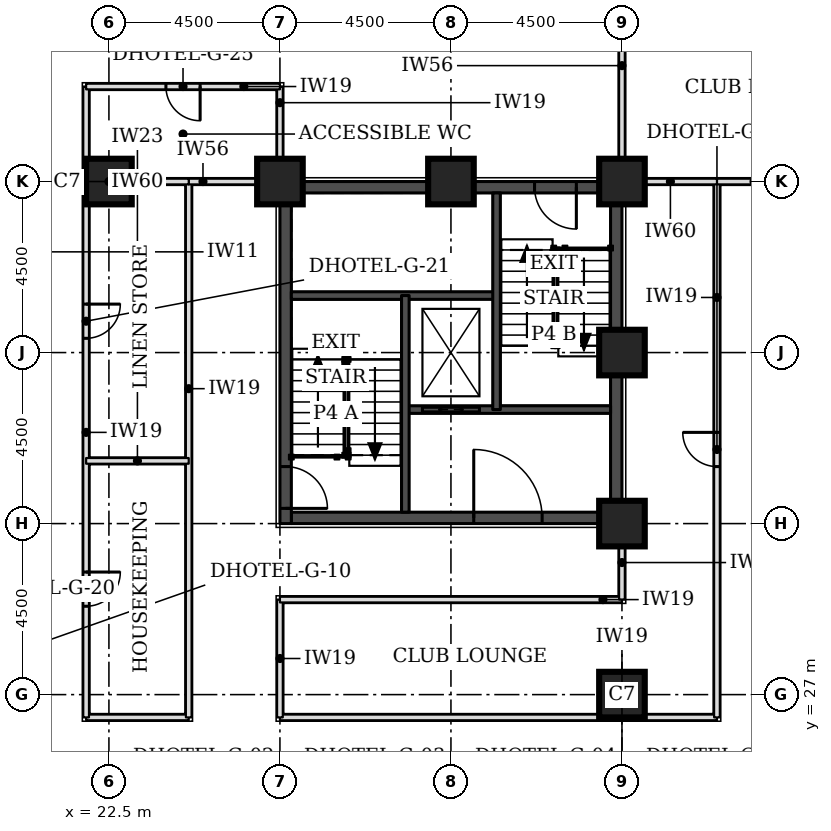
"""IFC4 building model, lengths in metres.
Left out: names, types, materials, properties, quantities, classifications, styles, units other than length and angle.
Written with IfcOpenShell. Run it as: python <this file> out.ifc"""

import sys

from ifc_helpers import new_model, si_unit, direction, frame, frame_2d, origin, origin_2d, place, context, subcontext, project, spatial, rectangle, extrude, element, fill, save


model = new_model("IFC4")
c1 = context("Model", 3, precision=1e-05, world=origin(), true_north=direction((0.0, 1.0)))
c2 = subcontext(c1, "Body", "Model", "MODEL_VIEW")
j1 = project(units=[si_unit("LENGTHUNIT", "METRE"), si_unit("PLANEANGLEUNIT", "RADIAN")], contexts=[c1])
p1 = place(None, origin())
s1 = spatial("IfcSite", under=j1, at=p1, CompositionType="ELEMENT")
p2 = place(p1, origin())
s2 = spatial("IfcBuilding", under=s1, at=p2, CompositionType="ELEMENT")
p3 = place(p2, frame((0.0, 0.0, 66.0)))
s3 = spatial("IfcBuildingStorey", under=s2, at=p3, CompositionType="ELEMENT", Elevation=66.0)
for number, where, z_axis, x_axis in (
    (1, (36.0, 27.0, 0.0), (0.0, 0.0, 1.0), (1.0, 0.0, 0.0)),
    (2, (36.0, 31.5, 0.0), (0.0, 0.0, 1.0), (1.0, 0.0, 0.0)),
    (3, (36.0, 36.0, 0.0), (0.0, 0.0, 1.0), (1.0, 0.0, 0.0)),
    (4, (22.5, 40.5, 0.0), (0.0, 0.0, 1.0), (1.0, 0.0, 0.0)),
    (5, (27.0, 40.5, 0.0), (0.0, 0.0, 1.0), (1.0, 0.0, 0.0)),
    (6, (31.5, 40.5, 0.0), (0.0, 0.0, 1.0), (1.0, 0.0, 0.0)),
    (7, (36.0, 40.5, 0.0), (0.0, 0.0, 1.0), (1.0, 0.0, 0.0)),
):
    element("IfcColumn", number, at=place(p3, frame(where, z_axis=z_axis, x_axis=x_axis)), inside=s3, PredefinedType="COLUMN", context=c2, shape_type="SweptSolid", body=[
        extrude(rectangle(XDim=1.2, YDim=1.2, at=origin_2d()), origin(), (0.0, 0.0, 1.0), 3.3),
    ])
p4 = place(p3, frame((27.3, 31.65, 0.0), z_axis=(0.0, 0.0, 1.0), x_axis=(1.0, 0.0, 0.0)))
e8 = element("IfcWall", 8, at=p4, inside=s3, PredefinedType="SHEAR", context=c2, shape_type="SweptSolid", body=[
    extrude(rectangle(XDim=8.4, YDim=0.3, at=frame_2d((4.2, 0.0))), origin(), (0.0, 0.0, 1.0), 3.3),
])
p5 = place(p4, frame((4.8, 0.0, 0.0)))
e9 = element("IfcOpeningElement", 9, at=p5, cuts=e8, PredefinedType="OPENING", context=c2, shape_type="SweptSolid", body=[
    extrude(rectangle(XDim=1.8, YDim=2.1, at=frame_2d((0.9, 1.05))), frame((0.0, 0.16, 0.0), z_axis=(0.0, -1.0, 0.0), x_axis=(1.0, 0.0, 0.0)), (0.0, 0.0, 1.0), 0.32),
])
p6 = place(p3, frame((27.3, 40.35, 0.0), z_axis=(0.0, 0.0, 1.0), x_axis=(1.0, 0.0, 0.0)))
e10 = element("IfcWall", 10, at=p6, inside=s3, PredefinedType="SHEAR", context=c2, shape_type="SweptSolid", body=[
    extrude(rectangle(XDim=8.4, YDim=0.3, at=frame_2d((4.2, 0.0))), origin(), (0.0, 0.0, 1.0), 3.3),
])
p7 = place(p6, frame((6.4, 0.0, 0.0)))
e11 = element("IfcOpeningElement", 11, at=p7, cuts=e10, PredefinedType="OPENING", context=c2, shape_type="SweptSolid", body=[
    extrude(rectangle(XDim=1.1, YDim=2.1, at=frame_2d((0.55, 1.05))), frame((0.0, 0.16, 0.0), z_axis=(0.0, -1.0, 0.0), x_axis=(1.0, 0.0, 0.0)), (0.0, 0.0, 1.0), 0.32),
])
p8 = place(p3, frame((27.15, 31.5, 0.0), z_axis=(0.0, 0.0, 1.0), x_axis=(0.0, 1.0, 0.0)))
e12 = element("IfcWall", 12, at=p8, inside=s3, PredefinedType="SHEAR", context=c2, shape_type="SweptSolid", body=[
    extrude(rectangle(XDim=9.0, YDim=0.3, at=frame_2d((4.5, 0.0))), origin(), (0.0, 0.0, 1.0), 3.3),
])
p9 = place(p8, frame((0.4, 0.0, 0.0)))
e13 = element("IfcOpeningElement", 13, at=p9, cuts=e12, PredefinedType="OPENING", context=c2, shape_type="SweptSolid", body=[
    extrude(rectangle(XDim=1.1, YDim=2.1, at=frame_2d((0.55, 1.05))), frame((0.0, 0.16, 0.0), z_axis=(0.0, -1.0, 0.0), x_axis=(1.0, 0.0, 0.0)), (0.0, 0.0, 1.0), 0.32),
])
p10 = place(p3, frame((35.85, 31.5, 0.0), z_axis=(0.0, 0.0, 1.0), x_axis=(0.0, 1.0, 0.0)))
e14 = element("IfcWall", 14, at=p10, inside=s3, PredefinedType="SHEAR", context=c2, shape_type="SweptSolid", body=[
    extrude(rectangle(XDim=9.0, YDim=0.3, at=frame_2d((4.5, 0.0))), origin(), (0.0, 0.0, 1.0), 3.3),
])
p11 = place(p3, frame((21.9, 26.4, 0.0), z_axis=(0.0, 0.0, 1.0), x_axis=(1.0, 0.0, 0.0)))
e15 = element("IfcWall", 15, at=p11, inside=s3, PredefinedType="PARTITIONING", context=c2, shape_type="SweptSolid", body=[
    extrude(rectangle(XDim=2.7, YDim=0.15, at=frame_2d((1.35, 0.0))), origin(), (0.0, 0.0, 1.0), 3.08),
])
p12 = place(p3, frame((21.9, 26.4, 0.0), z_axis=(0.0, 0.0, 1.0), x_axis=(0.0, 1.0, 0.0)))
e16 = element("IfcWall", 16, at=p12, inside=s3, PredefinedType="PARTITIONING", context=c2, shape_type="SweptSolid", body=[
    extrude(rectangle(XDim=16.6, YDim=0.15, at=frame_2d((8.3, 0.0))), origin(), (0.0, 0.0, 1.0), 3.08),
])
p13 = place(p12, frame((2.925, 0.0, 0.0)))
e17 = element("IfcOpeningElement", 17, at=p13, cuts=e16, PredefinedType="OPENING", context=c2, shape_type="SweptSolid", body=[
    extrude(rectangle(XDim=0.9, YDim=2.1, at=frame_2d((0.45, 1.05))), frame((0.0, 0.085, 0.0), z_axis=(0.0, -1.0, 0.0), x_axis=(1.0, 0.0, 0.0)), (0.0, 0.0, 1.0), 0.17),
])
p14 = place(p12, frame((9.975, 0.0, 0.0)))
e18 = element("IfcOpeningElement", 18, at=p14, cuts=e16, PredefinedType="OPENING", context=c2, shape_type="SweptSolid", body=[
    extrude(rectangle(XDim=0.9, YDim=2.1, at=frame_2d((0.45, 1.05))), frame((0.0, 0.085, 0.0), z_axis=(0.0, -1.0, 0.0), x_axis=(1.0, 0.0, 0.0)), (0.0, 0.0, 1.0), 0.17),
])
p15 = place(p3, frame((24.6, 26.4, 0.0), z_axis=(0.0, 0.0, 1.0), x_axis=(0.0, 1.0, 0.0)))
e19 = element("IfcWall", 19, at=p15, inside=s3, PredefinedType="PARTITIONING", context=c2, shape_type="SweptSolid", body=[
    extrude(rectangle(XDim=14.1, YDim=0.15, at=frame_2d((7.05, 0.0))), origin(), (0.0, 0.0, 1.0), 3.08),
])
p16 = place(p3, frame((27.0, 26.4, 0.0), z_axis=(0.0, 0.0, 1.0), x_axis=(1.0, 0.0, 0.0)))
e20 = element("IfcWall", 20, at=p16, inside=s3, PredefinedType="PARTITIONING", context=c2, shape_type="SweptSolid", body=[
    extrude(rectangle(XDim=11.5, YDim=0.15, at=frame_2d((5.75, 0.0))), origin(), (0.0, 0.0, 1.0), 3.08),
])
p17 = place(p3, frame((27.0, 26.4, 0.0), z_axis=(0.0, 0.0, 1.0), x_axis=(0.0, 1.0, 0.0)))
e21 = element("IfcWall", 21, at=p17, inside=s3, PredefinedType="PARTITIONING", context=c2, shape_type="SweptSolid", body=[
    extrude(rectangle(XDim=3.1, YDim=0.15, at=frame_2d((1.55, 0.0))), origin(), (0.0, 0.0, 1.0), 3.08),
])
p18 = place(p3, frame((38.5, 26.4, 0.0), z_axis=(0.0, 0.0, 1.0), x_axis=(0.0, 1.0, 0.0)))
e22 = element("IfcWall", 22, at=p18, inside=s3, PredefinedType="PARTITIONING", context=c2, shape_type="SweptSolid", body=[
    extrude(rectangle(XDim=14.1, YDim=0.15, at=frame_2d((7.05, 0.0))), origin(), (0.0, 0.0, 1.0), 3.08),
])
p19 = place(p18, frame((6.6, 0.0, 0.0)))
e23 = element("IfcOpeningElement", 23, at=p19, cuts=e22, PredefinedType="OPENING", context=c2, shape_type="SweptSolid", body=[
    extrude(rectangle(XDim=0.9, YDim=2.1, at=frame_2d((0.45, 1.05))), frame((0.0, 0.085, 0.0), z_axis=(0.0, -1.0, 0.0), x_axis=(1.0, 0.0, 0.0)), (0.0, 0.0, 1.0), 0.17),
])
p20 = place(p3, frame((27.0, 29.5, 0.0), z_axis=(0.0, 0.0, 1.0), x_axis=(1.0, 0.0, 0.0)))
e24 = element("IfcWall", 24, at=p20, inside=s3, PredefinedType="PARTITIONING", context=c2, shape_type="SweptSolid", body=[
    extrude(rectangle(XDim=9.0, YDim=0.15, at=frame_2d((4.5, 0.0))), origin(), (0.0, 0.0, 1.0), 3.08),
])
p21 = place(p3, frame((36.0, 29.5, 0.0), z_axis=(0.0, 0.0, 1.0), x_axis=(0.0, 1.0, 0.0)))
e25 = element("IfcWall", 25, at=p21, inside=s3, PredefinedType="PARTITIONING", context=c2, shape_type="SweptSolid", body=[
    extrude(rectangle(XDim=1.95, YDim=0.15, at=frame_2d((0.975, 0.0))), origin(), (0.0, 0.0, 1.0), 2.33),
])
p22 = place(p3, frame((24.6, 40.5, 0.0), z_axis=(0.0, 0.0, 1.0), x_axis=(1.0, 0.0, 0.0)))
e26 = element("IfcWall", 26, at=p22, inside=s3, PredefinedType="PARTITIONING", context=c2, shape_type="SweptSolid", body=[
    extrude(rectangle(XDim=2.35, YDim=0.15, at=frame_2d((1.175, 0.0))), origin(), (0.0, 0.0, 1.0), 2.33),
])
p23 = place(p3, frame((38.5, 40.5, 0.0), z_axis=(0.0, 0.0, 1.0), x_axis=(1.0, 0.0, 0.0)))
e27 = element("IfcWall", 27, at=p23, inside=s3, PredefinedType="PARTITIONING", context=c2, shape_type="SweptSolid", body=[
    extrude(rectangle(XDim=1.95, YDim=0.15, at=frame_2d((0.975, 0.0))), origin(), (0.0, 0.0, 1.0), 2.33),
])
p24 = place(p3, frame((27.0, 40.55, 0.0), z_axis=(0.0, 0.0, 1.0), x_axis=(0.0, 1.0, 0.0)))
e28 = element("IfcWall", 28, at=p24, inside=s3, PredefinedType="PARTITIONING", context=c2, shape_type="SweptSolid", body=[
    extrude(rectangle(XDim=2.45, YDim=0.15, at=frame_2d((1.225, 0.0))), origin(), (0.0, 0.0, 1.0), 3.08),
])
p25 = place(p3, frame((36.0, 40.55, 0.0), z_axis=(0.0, 0.0, 1.0), x_axis=(0.0, 1.0, 0.0)))
e29 = element("IfcWall", 29, at=p25, inside=s3, PredefinedType="PARTITIONING", context=c2, shape_type="SweptSolid", body=[
    extrude(rectangle(XDim=4.4, YDim=0.15, at=frame_2d((2.2, 0.0))), origin(), (0.0, 0.0, 1.0), 2.33),
])
p26 = place(p3, frame((21.9, 43.0, 0.0), z_axis=(0.0, 0.0, 1.0), x_axis=(1.0, 0.0, 0.0)))
e30 = element("IfcWall", 30, at=p26, inside=s3, PredefinedType="PARTITIONING", context=c2, shape_type="SweptSolid", body=[
    extrude(rectangle(XDim=5.1, YDim=0.15, at=frame_2d((2.55, 0.0))), origin(), (0.0, 0.0, 1.0), 3.08),
])
p27 = place(p26, frame((2.1, 0.0, 0.0)))
e31 = element("IfcOpeningElement", 31, at=p27, cuts=e30, PredefinedType="OPENING", context=c2, shape_type="SweptSolid", body=[
    extrude(rectangle(XDim=0.9, YDim=2.1, at=frame_2d((0.45, 1.05))), frame((0.0, 0.085, 0.0), z_axis=(0.0, -1.0, 0.0), x_axis=(1.0, 0.0, 0.0)), (0.0, 0.0, 1.0), 0.17),
])
p28 = place(p3, frame((21.9, 33.15, 0.0), z_axis=(0.0, 0.0, 1.0), x_axis=(1.0, 0.0, 0.0)))
e32 = element("IfcWall", 32, at=p28, inside=s3, PredefinedType="PARTITIONING", context=c2, shape_type="SweptSolid", body=[
    extrude(rectangle(XDim=2.7, YDim=0.15, at=frame_2d((1.35, 0.0))), origin(), (0.0, 0.0, 1.0), 3.08),
])
p29 = place(p3, frame((21.9, 40.5, 0.0), z_axis=(0.0, 0.0, 1.0), x_axis=(1.0, 0.0, 0.0)))
e33 = element("IfcWall", 33, at=p29, inside=s3, PredefinedType="PARTITIONING", context=c2, shape_type="SweptSolid", body=[
    extrude(rectangle(XDim=2.7, YDim=0.15, at=frame_2d((1.35, 0.0))), origin(), (0.0, 0.0, 1.0), 2.33),
])
p30 = place(p3, frame((36.05, 40.5, 0.0), z_axis=(0.0, 0.0, 1.0), x_axis=(1.0, 0.0, 0.0)))
e34 = element("IfcWall", 34, at=p30, inside=s3, PredefinedType="PARTITIONING", context=c2, shape_type="SweptSolid", body=[
    extrude(rectangle(XDim=2.45, YDim=0.15, at=frame_2d((1.225, 0.0))), origin(), (0.0, 0.0, 1.0), 2.33),
])
p31 = place(p3, frame((30.3, 34.5, 0.0), z_axis=(0.0, 0.0, 1.0), x_axis=(1.0, 0.0, 0.0)))
e35 = element("IfcWall", 35, at=p31, inside=s3, PredefinedType="SOLIDWALL", context=c2, shape_type="SweptSolid", body=[
    extrude(rectangle(XDim=5.4, YDim=0.2, at=frame_2d((2.7, 0.0))), origin(), (0.0, 0.0, 1.0), 3.08),
])
p32 = place(p31, frame((0.45, 0.0, 0.0)))
e36 = element("IfcOpeningElement", 36, at=p32, cuts=e35, PredefinedType="OPENING", context=c2, shape_type="SweptSolid", body=[
    extrude(rectangle(XDim=1.5, YDim=2.1, at=frame_2d((0.75, 1.05))), frame((0.0, 0.11, 0.0), z_axis=(0.0, -1.0, 0.0), x_axis=(1.0, 0.0, 0.0)), (0.0, 0.0, 1.0), 0.22),
])
p33 = place(p3, frame((27.3, 37.5, 0.0), z_axis=(0.0, 0.0, 1.0), x_axis=(1.0, 0.0, 0.0)))
e37 = element("IfcWall", 37, at=p33, inside=s3, PredefinedType="SOLIDWALL", context=c2, shape_type="SweptSolid", body=[
    extrude(rectangle(XDim=5.4, YDim=0.2, at=frame_2d((2.7, 0.0))), origin(), (0.0, 0.0, 1.0), 3.08),
])
for number, where, z_axis, x_axis in (
    (38, (30.3, 31.8, 0.0), (0.0, 0.0, 1.0), (0.0, 1.0, 0.0)),
    (39, (32.7, 34.5, 0.0), (0.0, 0.0, 1.0), (0.0, 1.0, 0.0)),
):
    element("IfcWall", number, at=place(p3, frame(where, z_axis=z_axis, x_axis=x_axis)), inside=s3, PredefinedType="SOLIDWALL", context=c2, shape_type="SweptSolid", body=[
        extrude(rectangle(XDim=5.7, YDim=0.2, at=frame_2d((2.85, 0.0))), origin(), (0.0, 0.0, 1.0), 3.08),
    ])
p34 = place(p13, frame((0.9, 0.0, 0.0), z_axis=(0.0, 0.0, 1.0), x_axis=(-1.0, 0.0, 0.0)))
e40 = element("IfcDoor", 40, at=p34, inside=s3, OperationType="SINGLE_SWING_LEFT", PredefinedType="DOOR", context=c2, shape_type="SweptSolid", body=[
    extrude(rectangle(XDim=0.9, YDim=2.1, at=frame_2d((0.45, 1.05))), frame((0.0, 0.025, 0.0), z_axis=(0.0, -1.0, 0.0), x_axis=(1.0, 0.0, 0.0)), (0.0, 0.0, 1.0), 0.05),
])
fill(e17, e40)
p35 = place(p14, frame((0.9, 0.0, 0.0), z_axis=(0.0, 0.0, 1.0), x_axis=(-1.0, 0.0, 0.0)))
e41 = element("IfcDoor", 41, at=p35, inside=s3, OperationType="SINGLE_SWING_LEFT", PredefinedType="DOOR", context=c2, shape_type="SweptSolid", body=[
    extrude(rectangle(XDim=0.9, YDim=2.1, at=frame_2d((0.45, 1.05))), frame((0.0, 0.025, 0.0), z_axis=(0.0, -1.0, 0.0), x_axis=(1.0, 0.0, 0.0)), (0.0, 0.0, 1.0), 0.05),
])
fill(e18, e41)
p36 = place(p19, origin())
e42 = element("IfcDoor", 42, at=p36, inside=s3, OperationType="SINGLE_SWING_RIGHT", PredefinedType="DOOR", context=c2, shape_type="SweptSolid", body=[
    extrude(rectangle(XDim=0.9, YDim=2.1, at=frame_2d((0.45, 1.05))), frame((0.0, 0.025, 0.0), z_axis=(0.0, -1.0, 0.0), x_axis=(1.0, 0.0, 0.0)), (0.0, 0.0, 1.0), 0.05),
])
fill(e23, e42)
p37 = place(p27, frame((0.9, 0.0, 0.0), z_axis=(0.0, 0.0, 1.0), x_axis=(-1.0, 0.0, 0.0)))
e43 = element("IfcDoor", 43, at=p37, inside=s3, OperationType="SINGLE_SWING_LEFT", PredefinedType="DOOR", context=c2, shape_type="SweptSolid", body=[
    extrude(rectangle(XDim=0.9, YDim=2.1, at=frame_2d((0.45, 1.05))), frame((0.0, 0.025, 0.0), z_axis=(0.0, -1.0, 0.0), x_axis=(1.0, 0.0, 0.0)), (0.0, 0.0, 1.0), 0.05),
])
fill(e31, e43)
p38 = place(p9, frame((1.1, 0.0, 0.0), z_axis=(0.0, 0.0, 1.0), x_axis=(-1.0, 0.0, 0.0)))
e44 = element("IfcDoor", 44, at=p38, inside=s3, OperationType="SINGLE_SWING_RIGHT", PredefinedType="DOOR", context=c2, shape_type="SweptSolid", body=[
    extrude(rectangle(XDim=1.1, YDim=2.1, at=frame_2d((0.55, 1.05))), frame((0.0, 0.025, 0.0), z_axis=(0.0, -1.0, 0.0), x_axis=(1.0, 0.0, 0.0)), (0.0, 0.0, 1.0), 0.05),
])
fill(e13, e44)
p39 = place(p7, frame((1.1, 0.0, 0.0), z_axis=(0.0, 0.0, 1.0), x_axis=(-1.0, 0.0, 0.0)))
e45 = element("IfcDoor", 45, at=p39, inside=s3, OperationType="SINGLE_SWING_LEFT", PredefinedType="DOOR", context=c2, shape_type="SweptSolid", body=[
    extrude(rectangle(XDim=1.1, YDim=2.1, at=frame_2d((0.55, 1.05))), frame((0.0, 0.025, 0.0), z_axis=(0.0, -1.0, 0.0), x_axis=(1.0, 0.0, 0.0)), (0.0, 0.0, 1.0), 0.05),
])
fill(e11, e45)
p40 = place(p32, origin())
e46 = element("IfcDoor", 46, at=p40, inside=s3, OperationType="DOUBLE_DOOR_SLIDING", PredefinedType="DOOR", context=c2, shape_type="SweptSolid", body=[
    extrude(rectangle(XDim=1.5, YDim=2.1, at=frame_2d((0.75, 1.05))), frame((0.0, 0.025, 0.0), z_axis=(0.0, -1.0, 0.0), x_axis=(1.0, 0.0, 0.0)), (0.0, 0.0, 1.0), 0.05),
])
fill(e36, e46)
p41 = place(p5, origin())
e47 = element("IfcDoor", 47, at=p41, inside=s3, OperationType="SINGLE_SWING_LEFT", PredefinedType="DOOR", context=c2, shape_type="SweptSolid", body=[
    extrude(rectangle(XDim=1.8, YDim=2.1, at=frame_2d((0.9, 1.05))), frame((0.0, 0.025, 0.0), z_axis=(0.0, -1.0, 0.0), x_axis=(1.0, 0.0, 0.0)), (0.0, 0.0, 1.0), 0.05),
])
fill(e9, e47)
save(model, sys.argv[1])
